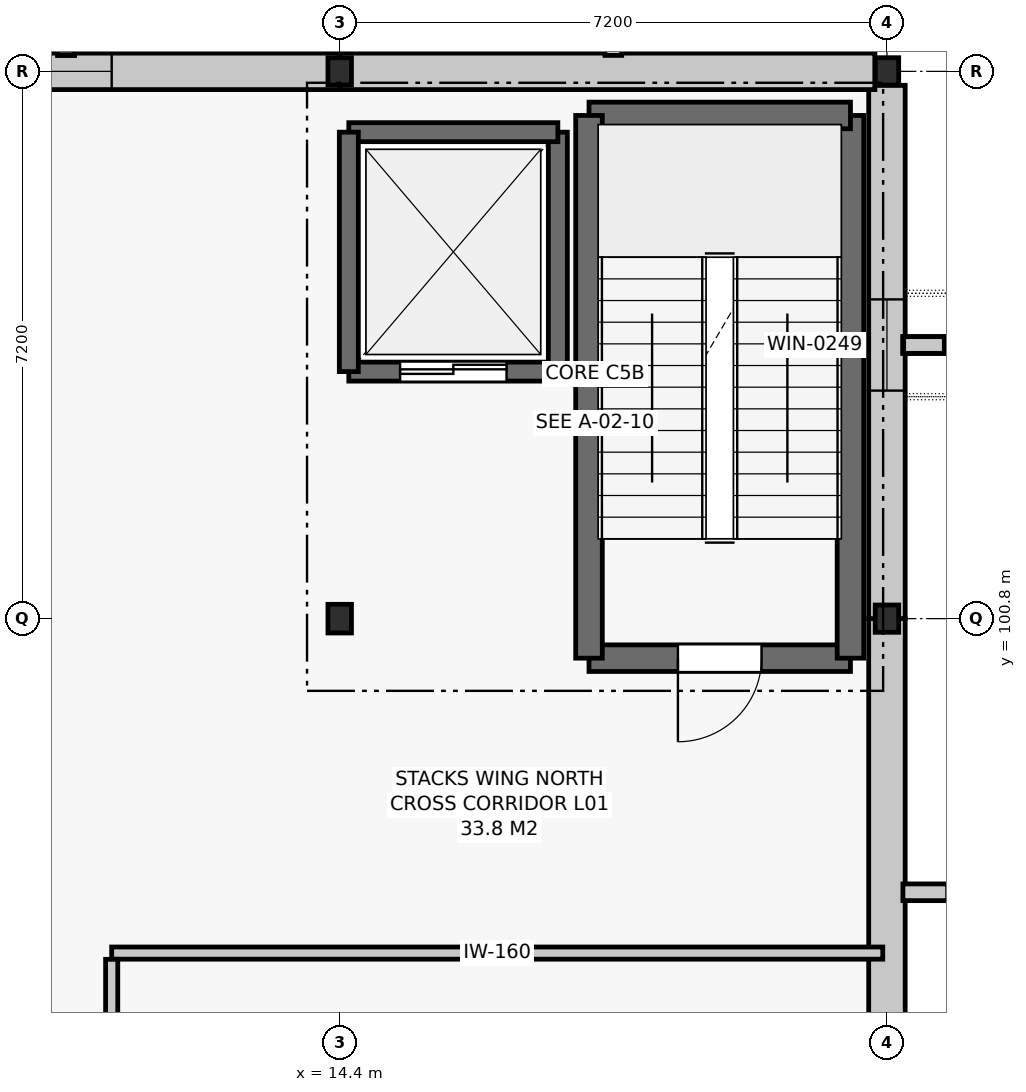
"""IFC4 building model, lengths in metres.
Left out: names, types, materials, properties, quantities, classifications, styles, units other than length and angle.
Written with IfcOpenShell. Run it as: python <this file> out.ifc"""

import sys

from ifc_helpers import new_model, si_unit, direction, frame, frame_2d, origin, origin_2d, place, context, subcontext, project, spatial, rectangle, i_section, extrude, element, fill, save


model = new_model("IFC4")
c1 = context("Model", 3, precision=1e-05, world=origin(), true_north=direction((0.0, 1.0)))
c2 = subcontext(c1, "Body", "Model", "MODEL_VIEW")
j1 = project(units=[si_unit("LENGTHUNIT", "METRE"), si_unit("PLANEANGLEUNIT", "RADIAN")], contexts=[c1])
p1 = place(None, origin())
s1 = spatial("IfcSite", under=j1, at=p1, CompositionType="ELEMENT")
p2 = place(p1, origin())
s2 = spatial("IfcBuilding", under=s1, at=p2, CompositionType="ELEMENT")
p3 = place(p2, frame((0.0, 0.0, 5.4)))
s3 = spatial("IfcBuildingStorey", under=s2, at=p3, CompositionType="ELEMENT", Elevation=5.4)
p4 = place(p3, frame((14.4, 100.8, 0.0), z_axis=(0.0, 0.0, 1.0), x_axis=(1.0, 0.0, 0.0)))
e1 = element("IfcColumn", 1, at=p4, inside=s3, PredefinedType="COLUMN", context=c2, shape_type="SweptSolid", body=[
    extrude(i_section(OverallWidth=0.309, OverallDepth=0.377, WebThickness=0.021, FlangeThickness=0.036, FilletRadius=0.027, at=origin_2d()), origin(), (0.0, 0.0, 1.0), 4.8),
])
for number, where, z_axis, x_axis in (
    (2, (14.4, 108.0, 0.0), (0.0, 0.0, 1.0), (1.0, 0.0, 0.0)),
    (3, (21.6, 100.8, 0.0), (0.0, 0.0, 1.0), (1.0, 0.0, 0.0)),
    (4, (21.6, 108.0, 0.0), (0.0, 0.0, 1.0), (1.0, 0.0, 0.0)),
):
    element("IfcColumn", number, at=place(p3, frame(where, z_axis=z_axis, x_axis=x_axis)), inside=s3, PredefinedType="COLUMN", context=c2, shape_type="SweptSolid", body=[
        extrude(i_section(OverallWidth=0.309, OverallDepth=0.359, WebThickness=0.021, FlangeThickness=0.035, FilletRadius=0.027, at=origin_2d()), origin(), (0.0, 0.0, 1.0), 4.8),
    ])
p5 = place(p3, frame((21.6, 93.6, 0.0), z_axis=(0.0, 0.0, 1.0), x_axis=(0.0, 1.0, 0.0)))
e5 = element("IfcWall", 5, at=p5, inside=s3, PredefinedType="SOLIDWALL", context=c2, shape_type="SweptSolid", body=[
    extrude(rectangle(XDim=7.2, YDim=0.48, at=frame_2d((3.6, 0.0))), origin(), (0.0, 0.0, 1.0), 3.78),
])
p6 = place(p3, frame((21.6, 100.8, 0.0), z_axis=(0.0, 0.0, 1.0), x_axis=(0.0, 1.0, 0.0)))
e6 = element("IfcWall", 6, at=p6, inside=s3, PredefinedType="SOLIDWALL", context=c2, shape_type="SweptSolid", body=[
    extrude(rectangle(XDim=7.016, YDim=0.48, at=frame_2d((3.508, 0.0))), origin(), (0.0, 0.0, 1.0), 3.78),
])
p7 = place(p6, frame((3.0, 0.0, 0.95)))
e7 = element("IfcOpeningElement", 7, at=p7, cuts=e6, PredefinedType="OPENING", context=c2, shape_type="SweptSolid", body=[
    extrude(rectangle(XDim=1.2, YDim=2.15, at=frame_2d((0.6, 1.075))), frame((0.0, 0.252, 0.0), z_axis=(0.0, -1.0, 0.0), x_axis=(1.0, 0.0, 0.0)), (0.0, 0.0, 1.0), 0.504),
])
p8 = place(p3, frame((21.441, 108.0, 0.0), z_axis=(0.0, 0.0, 1.0), x_axis=(-1.0, 0.0, 0.0)))
e8 = element("IfcWall", 8, at=p8, inside=s3, PredefinedType="SOLIDWALL", context=c2, shape_type="SweptSolid", body=[
    extrude(rectangle(XDim=7.042, YDim=0.48, at=frame_2d((3.521, 0.0))), origin(), (0.0, 0.0, 1.0), 3.78),
])
p9 = place(p3, frame((14.4, 108.0, 0.0), z_axis=(0.0, 0.0, 1.0), x_axis=(-1.0, 0.0, 0.0)))
e9 = element("IfcWall", 9, at=p9, inside=s3, PredefinedType="SOLIDWALL", context=c2, shape_type="SweptSolid", body=[
    extrude(rectangle(XDim=7.2, YDim=0.48, at=frame_2d((3.6, 0.0))), origin(), (0.0, 0.0, 1.0), 3.78),
])
p10 = place(p9, frame((3.0, 0.0, 0.95)))
e10 = element("IfcOpeningElement", 10, at=p10, cuts=e9, PredefinedType="OPENING", context=c2, shape_type="SweptSolid", body=[
    extrude(rectangle(XDim=1.2, YDim=2.15, at=frame_2d((0.6, 1.075))), frame((0.0, 0.252, 0.0), z_axis=(0.0, -1.0, 0.0), x_axis=(1.0, 0.0, 0.0)), (0.0, 0.0, 1.0), 0.504),
])
p11 = place(p3, frame((17.68, 100.28, 0.0), z_axis=(0.0, 0.0, 1.0), x_axis=(1.0, 0.0, 0.0)))
e11 = element("IfcWall", 11, at=p11, inside=s3, PredefinedType="SHEAR", context=c2, shape_type="SweptSolid", body=[
    extrude(rectangle(XDim=3.44, YDim=0.35, at=frame_2d((1.72, 0.0))), origin(), (0.0, 0.0, 1.0), 4.5),
])
p12 = place(p11, frame((1.17, 0.0, 0.0)))
e12 = element("IfcOpeningElement", 12, at=p12, cuts=e11, PredefinedType="OPENING", context=c2, shape_type="SweptSolid", body=[
    extrude(rectangle(XDim=1.1, YDim=2.15, at=frame_2d((0.55, 1.075))), frame((0.0, 0.187, 0.0), z_axis=(0.0, -1.0, 0.0), x_axis=(1.0, 0.0, 0.0)), (0.0, 0.0, 1.0), 0.374),
])
p13 = place(p3, frame((21.12, 100.28, 0.0), z_axis=(0.0, 0.0, 1.0), x_axis=(0.0, 1.0, 0.0)))
e13 = element("IfcWall", 13, at=p13, inside=s3, PredefinedType="SHEAR", context=c2, shape_type="SweptSolid", body=[
    extrude(rectangle(XDim=7.14, YDim=0.35, at=frame_2d((3.57, 0.0))), origin(), (0.0, 0.0, 1.0), 4.5),
])
p14 = place(p3, frame((21.12, 107.42, 0.0), z_axis=(0.0, 0.0, 1.0), x_axis=(-1.0, 0.0, 0.0)))
e14 = element("IfcWall", 14, at=p14, inside=s3, PredefinedType="SHEAR", context=c2, shape_type="SweptSolid", body=[
    extrude(rectangle(XDim=3.44, YDim=0.35, at=frame_2d((1.72, 0.0))), origin(), (0.0, 0.0, 1.0), 4.5),
])
p15 = place(p3, frame((17.68, 107.42, 0.0), z_axis=(0.0, 0.0, 1.0), x_axis=(0.0, -1.0, 0.0)))
e15 = element("IfcWall", 15, at=p15, inside=s3, PredefinedType="SHEAR", context=c2, shape_type="SweptSolid", body=[
    extrude(rectangle(XDim=7.14, YDim=0.35, at=frame_2d((3.57, 0.0))), origin(), (0.0, 0.0, 1.0), 4.5),
])
p16 = place(p3, frame((14.52, 104.05, 0.0), z_axis=(0.0, 0.0, 1.0), x_axis=(1.0, 0.0, 0.0)))
e16 = element("IfcWall", 16, at=p16, inside=s3, PredefinedType="SHEAR", context=c2, shape_type="SweptSolid", body=[
    extrude(rectangle(XDim=2.75, YDim=0.25, at=frame_2d((1.375, 0.0))), origin(), (0.0, 0.0, 1.0), 4.5),
])
p17 = place(p16, frame((0.675, 0.0, 0.0)))
e17 = element("IfcOpeningElement", 17, at=p17, cuts=e16, PredefinedType="OPENING", context=c2, shape_type="SweptSolid", body=[
    extrude(rectangle(XDim=1.4, YDim=2.2, at=frame_2d((0.7, 1.1))), frame((0.0, 0.137, 0.0), z_axis=(0.0, -1.0, 0.0), x_axis=(1.0, 0.0, 0.0)), (0.0, 0.0, 1.0), 0.274),
])
p18 = place(p3, frame((17.27, 104.05, 0.0), z_axis=(0.0, 0.0, 1.0), x_axis=(0.0, 1.0, 0.0)))
e18 = element("IfcWall", 18, at=p18, inside=s3, PredefinedType="SHEAR", context=c2, shape_type="SweptSolid", body=[
    extrude(rectangle(XDim=3.15, YDim=0.25, at=frame_2d((1.575, 0.0))), origin(), (0.0, 0.0, 1.0), 4.5),
])
p19 = place(p3, frame((17.27, 107.2, 0.0), z_axis=(0.0, 0.0, 1.0), x_axis=(-1.0, 0.0, 0.0)))
e19 = element("IfcWall", 19, at=p19, inside=s3, PredefinedType="SHEAR", context=c2, shape_type="SweptSolid", body=[
    extrude(rectangle(XDim=2.75, YDim=0.25, at=frame_2d((1.375, 0.0))), origin(), (0.0, 0.0, 1.0), 4.5),
])
p20 = place(p3, frame((14.52, 107.2, 0.0), z_axis=(0.0, 0.0, 1.0), x_axis=(0.0, -1.0, 0.0)))
e20 = element("IfcWall", 20, at=p20, inside=s3, PredefinedType="SHEAR", context=c2, shape_type="SweptSolid", body=[
    extrude(rectangle(XDim=3.15, YDim=0.25, at=frame_2d((1.575, 0.0))), origin(), (0.0, 0.0, 1.0), 4.5),
])
p21 = place(p3, frame((11.4, 96.4, 0.0), z_axis=(0.0, 0.0, 1.0), x_axis=(1.0, 0.0, 0.0)))
e21 = element("IfcWall", 21, at=p21, inside=s3, PredefinedType="PARTITIONING", context=c2, shape_type="SweptSolid", body=[
    extrude(rectangle(XDim=10.145, YDim=0.16, at=frame_2d((5.073, 0.0))), origin(), (0.0, 0.0, 1.0), 3.885),
])
p22 = place(p3, frame((11.4, 72.082, 0.0), z_axis=(0.0, 0.0, 1.0), x_axis=(0.0, 1.0, 0.0)))
e22 = element("IfcWall", 22, at=p22, inside=s3, PredefinedType="PARTITIONING", context=c2, shape_type="SweptSolid", body=[
    extrude(rectangle(XDim=24.236, YDim=0.16, at=frame_2d((12.118, 0.0))), origin(), (0.0, 0.0, 1.0), 3.885),
])
p23 = place(p22, frame((11.618, 0.0, 0.0)))
e23 = element("IfcOpeningElement", 23, at=p23, cuts=e22, PredefinedType="OPENING", context=c2, shape_type="SweptSolid", body=[
    extrude(rectangle(XDim=1.0, YDim=2.15, at=frame_2d((0.5, 1.075))), frame((0.0, 0.092, 0.0), z_axis=(0.0, -1.0, 0.0), x_axis=(1.0, 0.0, 0.0)), (0.0, 0.0, 1.0), 0.184),
])
p24 = place(p7, origin())
e24 = element("IfcWindow", 24, at=p24, inside=s3, PartitioningType="SINGLE_PANEL", PredefinedType="WINDOW", context=c2, shape_type="SweptSolid", body=[
    extrude(rectangle(XDim=1.2, YDim=2.15, at=frame_2d((0.6, 1.075))), frame((0.0, 0.03, 0.0), z_axis=(0.0, -1.0, 0.0), x_axis=(1.0, 0.0, 0.0)), (0.0, 0.0, 1.0), 0.06),
])
fill(e7, e24)
p25 = place(p10, origin())
e25 = element("IfcWindow", 25, at=p25, inside=s3, PartitioningType="SINGLE_PANEL", PredefinedType="WINDOW", context=c2, shape_type="SweptSolid", body=[
    extrude(rectangle(XDim=1.2, YDim=2.15, at=frame_2d((0.6, 1.075))), frame((0.0, 0.03, 0.0), z_axis=(0.0, -1.0, 0.0), x_axis=(1.0, 0.0, 0.0)), (0.0, 0.0, 1.0), 0.06),
])
fill(e10, e25)
p26 = place(p12, frame((1.1, 0.0, 0.0), z_axis=(0.0, 0.0, 1.0), x_axis=(-1.0, 0.0, 0.0)))
e26 = element("IfcDoor", 26, at=p26, inside=s3, OperationType="SINGLE_SWING_RIGHT", PredefinedType="DOOR", context=c2, shape_type="SweptSolid", body=[
    extrude(rectangle(XDim=1.1, YDim=2.15, at=frame_2d((0.55, 1.075))), frame((0.0, 0.025, 0.0), z_axis=(0.0, -1.0, 0.0), x_axis=(1.0, 0.0, 0.0)), (0.0, 0.0, 1.0), 0.05),
])
fill(e12, e26)
p27 = place(p17, origin())
e27 = element("IfcDoor", 27, at=p27, inside=s3, OperationType="DOUBLE_DOOR_SLIDING", PredefinedType="DOOR", context=c2, shape_type="SweptSolid", body=[
    extrude(rectangle(XDim=1.4, YDim=2.2, at=frame_2d((0.7, 1.1))), frame((0.0, 0.025, 0.0), z_axis=(0.0, -1.0, 0.0), x_axis=(1.0, 0.0, 0.0)), (0.0, 0.0, 1.0), 0.05),
])
fill(e17, e27)
save(model, sys.argv[1])
